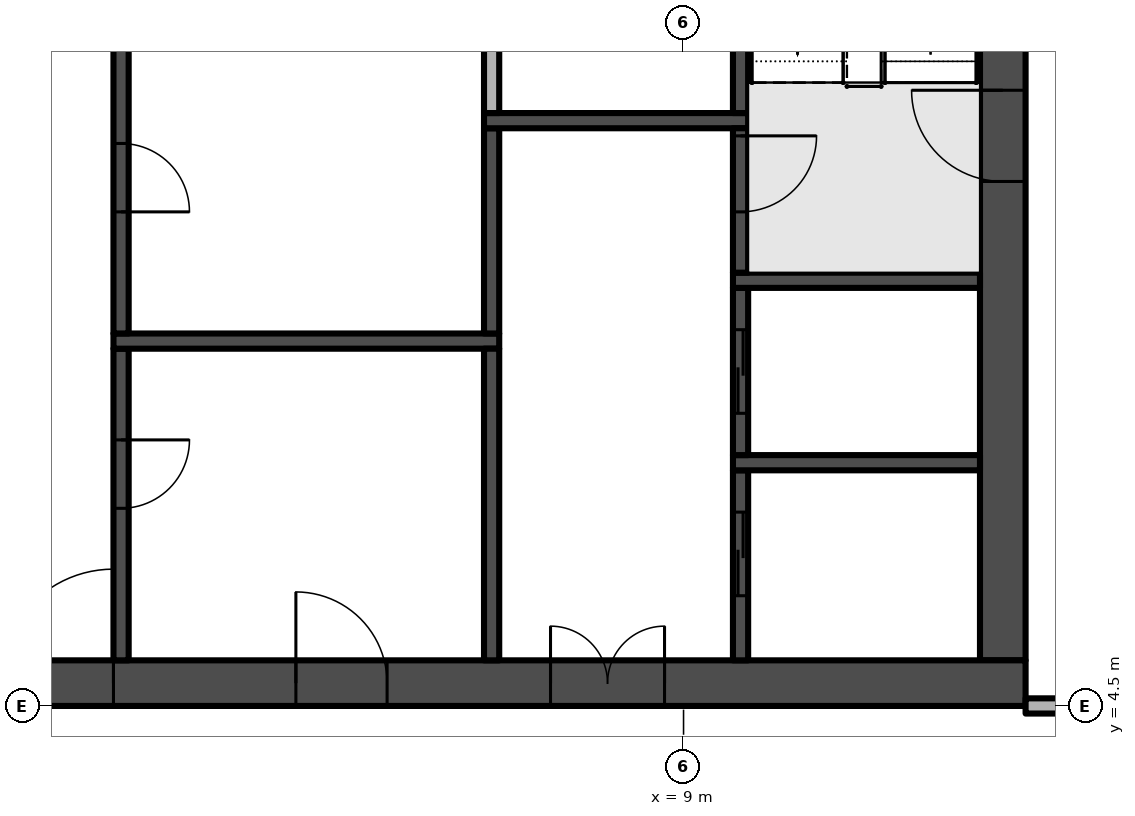
"""IFC4 building model, lengths in metres.
Left out: names, types, materials, properties, quantities, classifications, styles, units other than length and angle.
Written with IfcOpenShell. Run it as: python <this file> out.ifc"""

import sys

from ifc_helpers import new_model, si_unit, direction, frame, frame_2d, origin, place, context, subcontext, project, spatial, rectangle, extrude, element, fill, save


model = new_model("IFC4")
c1 = context("Model", 3, precision=1e-05, world=origin(), true_north=direction((0.0, 1.0)))
c2 = subcontext(c1, "Body", "Model", "MODEL_VIEW")
j1 = project(units=[si_unit("LENGTHUNIT", "METRE"), si_unit("PLANEANGLEUNIT", "RADIAN")], contexts=[c1])
p1 = place(None, origin())
s1 = spatial("IfcSite", under=j1, at=p1, CompositionType="ELEMENT")
p2 = place(p1, origin())
s2 = spatial("IfcBuilding", under=s1, at=p2, CompositionType="ELEMENT")
p3 = place(p2, frame((0.0, 0.0, 289.4)))
s3 = spatial("IfcBuildingStorey", under=s2, at=p3, CompositionType="ELEMENT", Elevation=289.4)
p4 = place(p3, frame((-13.5, 4.8, -0.3), z_axis=(0.0, 0.0, 1.0), x_axis=(1.0, 0.0, 0.0)))
e1 = element("IfcWall", 1, at=p4, inside=s3, PredefinedType="SHEAR", context=c2, shape_type="SweptSolid", body=[
    extrude(rectangle(XDim=27.0, YDim=0.6, at=frame_2d((13.5, 0.0))), origin(), (0.0, 0.0, 1.0), 8.0),
])
p5 = place(p4, frame((12.0, 0.0, 0.3)))
e2 = element("IfcOpeningElement", 2, at=p5, cuts=e1, PredefinedType="OPENING", context=c2, shape_type="SweptSolid", body=[
    extrude(rectangle(XDim=3.0, YDim=2.4, at=frame_2d((1.5, 1.2))), frame((0.0, 0.31, 0.0), z_axis=(0.0, -1.0, 0.0), x_axis=(1.0, 0.0, 0.0)), (0.0, 0.0, 1.0), 0.62),
])
p6 = place(p4, frame((4.9, 0.0, 0.3)))
e3 = element("IfcOpeningElement", 3, at=p6, cuts=e1, PredefinedType="OPENING", context=c2, shape_type="SweptSolid", body=[
    extrude(rectangle(XDim=1.2, YDim=2.2, at=frame_2d((0.6, 1.1))), frame((0.0, 0.31, 0.0), z_axis=(0.0, -1.0, 0.0), x_axis=(1.0, 0.0, 0.0)), (0.0, 0.0, 1.0), 0.62),
])
p7 = place(p4, frame((20.75, 0.0, 0.3)))
e4 = element("IfcOpeningElement", 4, at=p7, cuts=e1, PredefinedType="OPENING", context=c2, shape_type="SweptSolid", body=[
    extrude(rectangle(XDim=1.5, YDim=2.2, at=frame_2d((0.75, 1.1))), frame((0.0, 0.31, 0.0), z_axis=(0.0, -1.0, 0.0), x_axis=(1.0, 0.0, 0.0)), (0.0, 0.0, 1.0), 0.62),
])
p8 = place(p4, frame((17.4, 0.0, 0.3)))
e5 = element("IfcOpeningElement", 5, at=p8, cuts=e1, PredefinedType="OPENING", context=c2, shape_type="SweptSolid", body=[
    extrude(rectangle(XDim=1.2, YDim=2.2, at=frame_2d((0.6, 1.1))), frame((0.0, 0.31, 0.0), z_axis=(0.0, -1.0, 0.0), x_axis=(1.0, 0.0, 0.0)), (0.0, 0.0, 1.0), 0.62),
])
p9 = place(p3, frame((13.2, 5.1, -0.3), z_axis=(0.0, 0.0, 1.0), x_axis=(0.0, 1.0, 0.0)))
e6 = element("IfcWall", 6, at=p9, inside=s3, PredefinedType="SHEAR", context=c2, shape_type="SweptSolid", body=[
    extrude(rectangle(XDim=16.8, YDim=0.6, at=frame_2d((8.4, 0.0))), origin(), (0.0, 0.0, 1.0), 8.0),
])
p10 = place(p9, frame((6.3, 0.0, 0.3)))
e7 = element("IfcOpeningElement", 7, at=p10, cuts=e6, PredefinedType="OPENING", context=c2, shape_type="SweptSolid", body=[
    extrude(rectangle(XDim=1.2, YDim=2.2, at=frame_2d((0.6, 1.1))), frame((0.0, 0.31, 0.0), z_axis=(0.0, -1.0, 0.0), x_axis=(1.0, 0.0, 0.0)), (0.0, 0.0, 1.0), 0.62),
])
p11 = place(p3, frame((1.6, 9.2, 0.0), z_axis=(0.0, 0.0, 1.0), x_axis=(0.0, -1.0, 0.0)))
e8 = element("IfcWall", 8, at=p11, inside=s3, PredefinedType="SHEAR", context=c2, shape_type="SweptSolid", body=[
    extrude(rectangle(XDim=4.1, YDim=0.2, at=frame_2d((2.05, 0.0))), origin(), (0.0, 0.0, 1.0), 7.7),
])
p12 = place(p11, frame((1.2, 0.0, 0.0)))
e9 = element("IfcOpeningElement", 9, at=p12, cuts=e8, PredefinedType="OPENING", context=c2, shape_type="SweptSolid", body=[
    extrude(rectangle(XDim=0.9, YDim=2.1, at=frame_2d((0.45, 1.05))), frame((0.0, 0.11, 0.0), z_axis=(0.0, -1.0, 0.0), x_axis=(1.0, 0.0, 0.0)), (0.0, 0.0, 1.0), 0.22),
])
p13 = place(p3, frame((1.5, 9.3, 0.0), z_axis=(0.0, 0.0, 1.0), x_axis=(1.0, 0.0, 0.0)))
e10 = element("IfcWall", 10, at=p13, inside=s3, PredefinedType="SHEAR", context=c2, shape_type="SweptSolid", body=[
    extrude(rectangle(XDim=5.075, YDim=0.2, at=frame_2d((2.538, 0.0))), origin(), (0.0, 0.0, 1.0), 7.7),
])
p14 = place(p3, frame((1.6, 13.5, 0.0), z_axis=(0.0, 0.0, 1.0), x_axis=(0.0, -1.0, 0.0)))
e11 = element("IfcWall", 11, at=p14, inside=s3, PredefinedType="SHEAR", context=c2, shape_type="SweptSolid", body=[
    extrude(rectangle(XDim=4.1, YDim=0.2, at=frame_2d((2.05, 0.0))), origin(), (0.0, 0.0, 1.0), 7.7),
])
p15 = place(p14, frame((1.6, 0.0, 0.0)))
e12 = element("IfcOpeningElement", 12, at=p15, cuts=e11, PredefinedType="OPENING", context=c2, shape_type="SweptSolid", body=[
    extrude(rectangle(XDim=0.9, YDim=2.1, at=frame_2d((0.45, 1.05))), frame((0.0, 0.11, 0.0), z_axis=(0.0, -1.0, 0.0), x_axis=(1.0, 0.0, 0.0)), (0.0, 0.0, 1.0), 0.22),
])
p16 = place(p3, frame((6.475, 5.1, 0.0), z_axis=(0.0, 0.0, 1.0), x_axis=(0.0, 1.0, 0.0)))
e13 = element("IfcWall", 13, at=p16, inside=s3, PredefinedType="SHEAR", context=c2, shape_type="SweptSolid", body=[
    extrude(rectangle(XDim=4.1, YDim=0.2, at=frame_2d((2.05, 0.0))), origin(), (0.0, 0.0, 1.0), 7.7),
])
p17 = place(p3, frame((6.475, 9.4, 0.0), z_axis=(0.0, 0.0, 1.0), x_axis=(0.0, 1.0, 0.0)))
e14 = element("IfcWall", 14, at=p17, inside=s3, PredefinedType="SHEAR", context=c2, shape_type="SweptSolid", body=[
    extrude(rectangle(XDim=2.7, YDim=0.2, at=frame_2d((1.35, 0.0))), origin(), (0.0, 0.0, 1.0), 7.7),
])
p18 = place(p3, frame((6.375, 12.2, 0.0), z_axis=(0.0, 0.0, 1.0), x_axis=(1.0, 0.0, 0.0)))
e15 = element("IfcWall", 15, at=p18, inside=s3, PredefinedType="SHEAR", context=c2, shape_type="SweptSolid", body=[
    extrude(rectangle(XDim=3.475, YDim=0.2, at=frame_2d((1.738, 0.0))), origin(), (0.0, 0.0, 1.0), 7.7),
])
p19 = place(p3, frame((6.475, 12.3, 0.0), z_axis=(0.0, 0.0, 1.0), x_axis=(0.0, 1.0, 0.0)))
e16 = element("IfcWall", 16, at=p19, inside=s3, PredefinedType="PARTITIONING", context=c2, shape_type="SweptSolid", body=[
    extrude(rectangle(XDim=1.2, YDim=0.2, at=frame_2d((0.6, 0.0))), origin(), (0.0, 0.0, 1.0), 7.7),
])
p20 = place(p3, frame((9.75, 5.1, 0.0), z_axis=(0.0, 0.0, 1.0), x_axis=(0.0, 1.0, 0.0)))
e17 = element("IfcWall", 17, at=p20, inside=s3, PredefinedType="SHEAR", context=c2, shape_type="SweptSolid", body=[
    extrude(rectangle(XDim=2.5, YDim=0.2, at=frame_2d((1.25, 0.0))), origin(), (0.0, 0.0, 1.0), 7.7),
])
p21 = place(p20, frame((0.85, 0.0, 0.0)))
e18 = element("IfcOpeningElement", 18, at=p21, cuts=e17, PredefinedType="OPENING", context=c2, shape_type="SweptSolid", body=[
    extrude(rectangle(XDim=1.1, YDim=2.1, at=frame_2d((0.55, 1.05))), frame((0.0, 0.11, 0.0), z_axis=(0.0, -1.0, 0.0), x_axis=(1.0, 0.0, 0.0)), (0.0, 0.0, 1.0), 0.22),
])
p22 = place(p3, frame((9.65, 7.7, 0.0), z_axis=(0.0, 0.0, 1.0), x_axis=(1.0, 0.0, 0.0)))
e19 = element("IfcWall", 19, at=p22, inside=s3, PredefinedType="SHEAR", context=c2, shape_type="SweptSolid", body=[
    extrude(rectangle(XDim=3.25, YDim=0.2, at=frame_2d((1.625, 0.0))), origin(), (0.0, 0.0, 1.0), 7.7),
])
p23 = place(p3, frame((9.75, 7.8, 0.0), z_axis=(0.0, 0.0, 1.0), x_axis=(0.0, 1.0, 0.0)))
e20 = element("IfcWall", 20, at=p23, inside=s3, PredefinedType="SHEAR", context=c2, shape_type="SweptSolid", body=[
    extrude(rectangle(XDim=2.2, YDim=0.2, at=frame_2d((1.1, 0.0))), origin(), (0.0, 0.0, 1.0), 7.7),
])
p24 = place(p23, frame((0.55, 0.0, 0.0)))
e21 = element("IfcOpeningElement", 21, at=p24, cuts=e20, PredefinedType="OPENING", context=c2, shape_type="SweptSolid", body=[
    extrude(rectangle(XDim=1.1, YDim=2.1, at=frame_2d((0.55, 1.05))), frame((0.0, 0.11, 0.0), z_axis=(0.0, -1.0, 0.0), x_axis=(1.0, 0.0, 0.0)), (0.0, 0.0, 1.0), 0.22),
])
p25 = place(p3, frame((9.65, 10.1, 0.0), z_axis=(0.0, 0.0, 1.0), x_axis=(1.0, 0.0, 0.0)))
e22 = element("IfcWall", 22, at=p25, inside=s3, PredefinedType="SHEAR", context=c2, shape_type="SweptSolid", body=[
    extrude(rectangle(XDim=3.25, YDim=0.2, at=frame_2d((1.625, 0.0))), origin(), (0.0, 0.0, 1.0), 7.7),
])
p26 = place(p3, frame((9.75, 12.1, 0.0), z_axis=(0.0, 0.0, 1.0), x_axis=(0.0, -1.0, 0.0)))
e23 = element("IfcWall", 23, at=p26, inside=s3, PredefinedType="SHEAR", context=c2, shape_type="SweptSolid", body=[
    extrude(rectangle(XDim=1.9, YDim=0.2, at=frame_2d((0.95, 0.0))), origin(), (0.0, 0.0, 1.0), 7.7),
])
p27 = place(p26, frame((0.1, 0.0, 0.0)))
e24 = element("IfcOpeningElement", 24, at=p27, cuts=e23, PredefinedType="OPENING", context=c2, shape_type="SweptSolid", body=[
    extrude(rectangle(XDim=1.0, YDim=2.2, at=frame_2d((0.5, 1.1))), frame((0.0, 0.11, 0.0), z_axis=(0.0, -1.0, 0.0), x_axis=(1.0, 0.0, 0.0)), (0.0, 0.0, 1.0), 0.22),
])
p28 = place(p3, frame((9.75, 12.3, 0.0), z_axis=(0.0, 0.0, 1.0), x_axis=(0.0, 1.0, 0.0)))
e25 = element("IfcWall", 25, at=p28, inside=s3, PredefinedType="SHEAR", context=c2, shape_type="SweptSolid", body=[
    extrude(rectangle(XDim=3.6, YDim=0.2, at=frame_2d((1.8, 0.0))), origin(), (0.0, 0.0, 1.0), 7.7),
])
p29 = place(p3, frame((17.55, 4.5, 0.0), z_axis=(0.0, 0.0, 1.0), x_axis=(-1.0, 0.0, 0.0)))
e26 = element("IfcWall", 26, at=p29, inside=s3, PredefinedType="PARTITIONING", context=c2, shape_type="SweptSolid", body=[
    extrude(rectangle(XDim=4.05, YDim=0.2, at=frame_2d((2.025, 0.0))), origin(), (0.0, 0.0, 1.0), 7.7),
])
p30 = place(p29, frame((0.15, 0.0, 0.0)))
e27 = element("IfcOpeningElement", 27, at=p30, cuts=e26, PredefinedType="OPENING", context=c2, shape_type="SweptSolid", body=[
    extrude(rectangle(XDim=1.2, YDim=2.4, at=frame_2d((0.6, 1.2))), frame((0.0, 0.11, 0.0), z_axis=(0.0, -1.0, 0.0), x_axis=(1.0, 0.0, 0.0)), (0.0, 0.0, 1.0), 0.22),
])
p31 = place(p5, frame((3.0, 0.0, 0.0), z_axis=(0.0, 0.0, 1.0), x_axis=(-1.0, 0.0, 0.0)))
e28 = element("IfcDoor", 28, at=p31, inside=s3, OperationType="DOUBLE_DOOR_SINGLE_SWING", PredefinedType="DOOR", context=c2, shape_type="SweptSolid", body=[
    extrude(rectangle(XDim=3.0, YDim=2.4, at=frame_2d((1.5, 1.2))), frame((0.0, 0.025, 0.0), z_axis=(0.0, -1.0, 0.0), x_axis=(1.0, 0.0, 0.0)), (0.0, 0.0, 1.0), 0.05),
])
fill(e2, e28)
p32 = place(p10, frame((1.2, 0.0, 0.0), z_axis=(0.0, 0.0, 1.0), x_axis=(-1.0, 0.0, 0.0)))
e29 = element("IfcDoor", 29, at=p32, inside=s3, OperationType="SINGLE_SWING_LEFT", PredefinedType="DOOR", context=c2, shape_type="SweptSolid", body=[
    extrude(rectangle(XDim=1.2, YDim=2.2, at=frame_2d((0.6, 1.1))), frame((0.0, 0.025, 0.0), z_axis=(0.0, -1.0, 0.0), x_axis=(1.0, 0.0, 0.0)), (0.0, 0.0, 1.0), 0.05),
])
fill(e7, e29)
p33 = place(p7, frame((1.5, 0.0, 0.0), z_axis=(0.0, 0.0, 1.0), x_axis=(-1.0, 0.0, 0.0)))
e30 = element("IfcDoor", 30, at=p33, inside=s3, OperationType="DOUBLE_DOOR_SINGLE_SWING", PredefinedType="DOOR", context=c2, shape_type="SweptSolid", body=[
    extrude(rectangle(XDim=1.5, YDim=2.2, at=frame_2d((0.75, 1.1))), frame((0.0, 0.025, 0.0), z_axis=(0.0, -1.0, 0.0), x_axis=(1.0, 0.0, 0.0)), (0.0, 0.0, 1.0), 0.05),
])
fill(e4, e30)
p34 = place(p8, frame((1.2, 0.0, 0.0), z_axis=(0.0, 0.0, 1.0), x_axis=(-1.0, 0.0, 0.0)))
e31 = element("IfcDoor", 31, at=p34, inside=s3, OperationType="SINGLE_SWING_RIGHT", PredefinedType="DOOR", context=c2, shape_type="SweptSolid", body=[
    extrude(rectangle(XDim=1.2, YDim=2.2, at=frame_2d((0.6, 1.1))), frame((0.0, 0.025, 0.0), z_axis=(0.0, -1.0, 0.0), x_axis=(1.0, 0.0, 0.0)), (0.0, 0.0, 1.0), 0.05),
])
fill(e5, e31)
p35 = place(p27, origin())
e32 = element("IfcDoor", 32, at=p35, inside=s3, OperationType="SINGLE_SWING_LEFT", PredefinedType="DOOR", context=c2, shape_type="SweptSolid", body=[
    extrude(rectangle(XDim=1.0, YDim=2.2, at=frame_2d((0.5, 1.1))), frame((0.0, 0.025, 0.0), z_axis=(0.0, -1.0, 0.0), x_axis=(1.0, 0.0, 0.0)), (0.0, 0.0, 1.0), 0.05),
])
fill(e24, e32)
p36 = place(p21, origin())
e33 = element("IfcDoor", 33, at=p36, inside=s3, OperationType="SLIDING_TO_RIGHT", PredefinedType="DOOR", context=c2, shape_type="SweptSolid", body=[
    extrude(rectangle(XDim=1.1, YDim=2.1, at=frame_2d((0.55, 1.05))), frame((0.0, 0.025, 0.0), z_axis=(0.0, -1.0, 0.0), x_axis=(1.0, 0.0, 0.0)), (0.0, 0.0, 1.0), 0.05),
])
fill(e18, e33)
p37 = place(p24, origin())
e34 = element("IfcDoor", 34, at=p37, inside=s3, OperationType="SLIDING_TO_RIGHT", PredefinedType="DOOR", context=c2, shape_type="SweptSolid", body=[
    extrude(rectangle(XDim=1.1, YDim=2.1, at=frame_2d((0.55, 1.05))), frame((0.0, 0.025, 0.0), z_axis=(0.0, -1.0, 0.0), x_axis=(1.0, 0.0, 0.0)), (0.0, 0.0, 1.0), 0.05),
])
fill(e21, e34)
p38 = place(p12, origin())
e35 = element("IfcDoor", 35, at=p38, inside=s3, OperationType="SINGLE_SWING_LEFT", PredefinedType="DOOR", context=c2, shape_type="SweptSolid", body=[
    extrude(rectangle(XDim=0.9, YDim=2.1, at=frame_2d((0.45, 1.05))), frame((0.0, 0.025, 0.0), z_axis=(0.0, -1.0, 0.0), x_axis=(1.0, 0.0, 0.0)), (0.0, 0.0, 1.0), 0.05),
])
fill(e9, e35)
p39 = place(p15, origin())
e36 = element("IfcDoor", 36, at=p39, inside=s3, OperationType="SINGLE_SWING_RIGHT", PredefinedType="DOOR", context=c2, shape_type="SweptSolid", body=[
    extrude(rectangle(XDim=0.9, YDim=2.1, at=frame_2d((0.45, 1.05))), frame((0.0, 0.025, 0.0), z_axis=(0.0, -1.0, 0.0), x_axis=(1.0, 0.0, 0.0)), (0.0, 0.0, 1.0), 0.05),
])
fill(e12, e36)
save(model, sys.argv[1])
